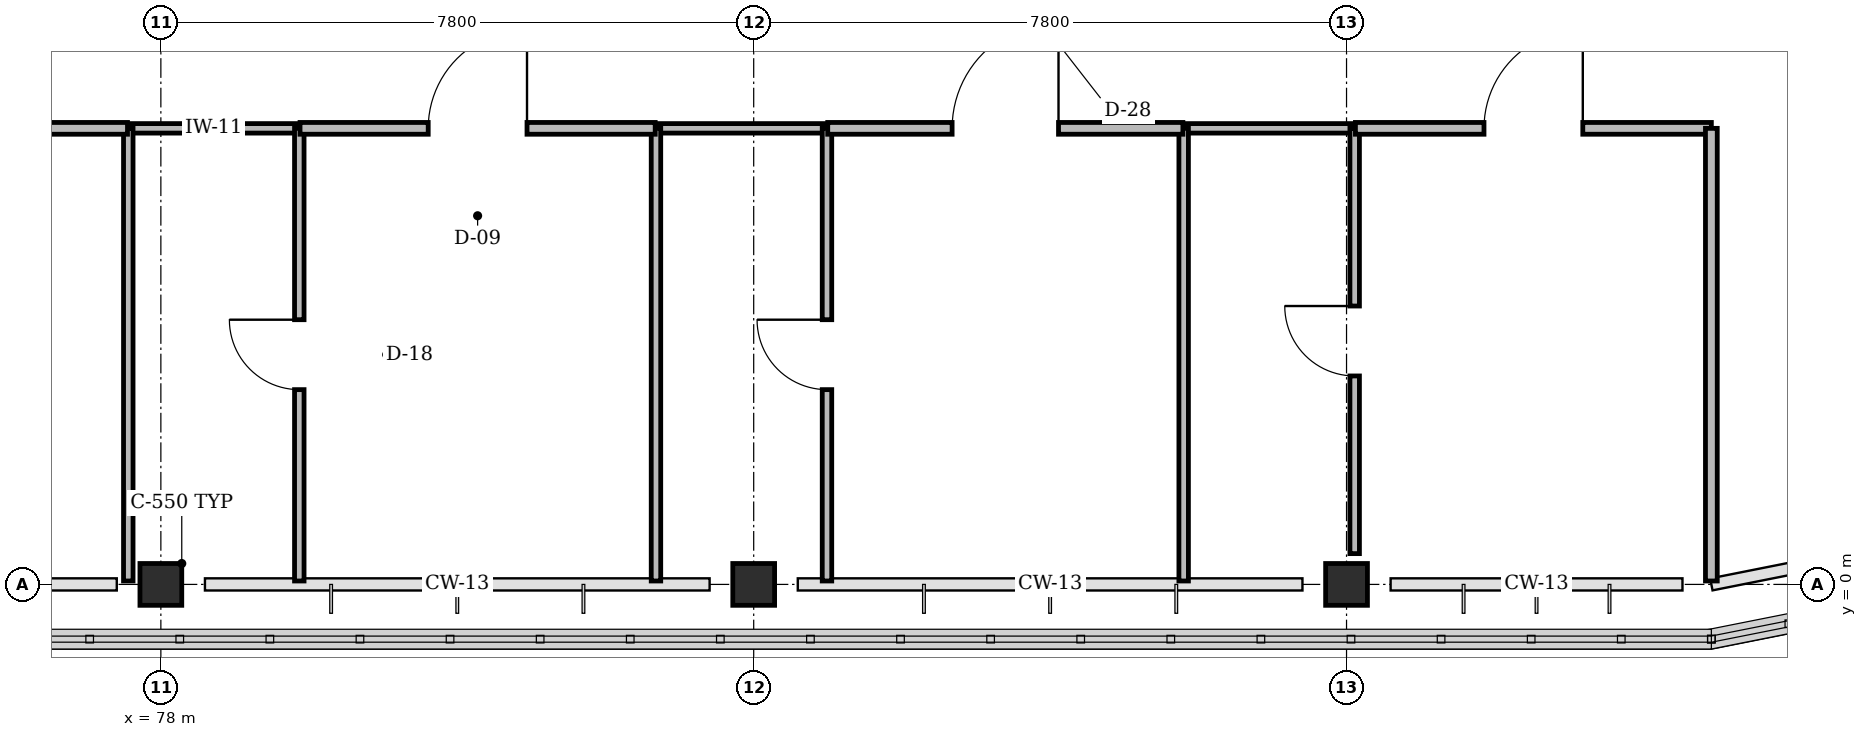
"""IFC4 building model, lengths in metres.
Left out: names, types, materials, properties, quantities, classifications, styles, units other than length and angle.
Written with IfcOpenShell. Run it as: python <this file> out.ifc"""

import sys

from ifc_helpers import new_model, si_unit, direction, frame, frame_2d, origin, origin_2d, place, context, subcontext, project, spatial, rectangle, extrude, element, fill, save


model = new_model("IFC4")
c1 = context("Model", 3, precision=1e-05, world=origin(), true_north=direction((0.0, 1.0)))
c2 = subcontext(c1, "Body", "Model", "MODEL_VIEW")
j1 = project(units=[si_unit("LENGTHUNIT", "METRE"), si_unit("PLANEANGLEUNIT", "RADIAN")], contexts=[c1])
p1 = place(None, origin())
s1 = spatial("IfcSite", under=j1, at=p1, CompositionType="ELEMENT")
p2 = place(p1, origin())
s2 = spatial("IfcBuilding", under=s1, at=p2, CompositionType="ELEMENT")
p3 = place(p2, frame((0.0, 0.0, 34.8)))
s3 = spatial("IfcBuildingStorey", under=s2, at=p3, CompositionType="ELEMENT", Elevation=34.8)
for number, where, z_axis, x_axis in (
    (1, (78.0, 0.0, 0.0), (0.0, 0.0, 1.0), (1.0, 0.0, 0.0)),
    (2, (85.8, 0.0, 0.0), (0.0, 0.0, 1.0), (1.0, 0.0, 0.0)),
    (3, (93.6, 0.0, 0.0), (0.0, 0.0, 1.0), (1.0, 0.0, 0.0)),
):
    element("IfcColumn", number, at=place(p3, frame(where, z_axis=z_axis, x_axis=x_axis)), inside=s3, PredefinedType="COLUMN", context=c2, shape_type="SweptSolid", body=[
        extrude(rectangle(XDim=0.55, YDim=0.55, at=origin_2d()), origin(), (0.0, 0.0, 1.0), 4.2),
    ])
p4 = place(p3, frame((77.571, 6.0, 0.0), z_axis=(0.0, 0.0, 1.0), x_axis=(1.0, 0.0, 0.0)))
e4 = element("IfcWall", 4, at=p4, inside=s3, PredefinedType="PARTITIONING", context=c2, shape_type="SweptSolid", body=[
    extrude(rectangle(XDim=2.25, YDim=0.125, at=frame_2d((1.125, 0.0))), origin(), (0.0, 0.0, 1.0), 3.9),
])
p5 = place(p3, frame((77.571, 0.045, 0.0), z_axis=(0.0, 0.0, 1.0), x_axis=(0.0, 1.0, 0.0)))
e5 = element("IfcWall", 5, at=p5, inside=s3, PredefinedType="PARTITIONING", context=c2, shape_type="SweptSolid", body=[
    extrude(rectangle(XDim=5.955, YDim=0.125, at=frame_2d((2.978, 0.0))), origin(), (0.0, 0.0, 1.0), 3.32),
])
p6 = place(p3, frame((79.821, 0.045, 0.0), z_axis=(0.0, 0.0, 1.0), x_axis=(0.0, 1.0, 0.0)))
e6 = element("IfcWall", 6, at=p6, inside=s3, PredefinedType="PARTITIONING", context=c2, shape_type="SweptSolid", body=[
    extrude(rectangle(XDim=5.955, YDim=0.125, at=frame_2d((2.978, 0.0))), origin(), (0.0, 0.0, 1.0), 3.9),
])
p7 = place(p6, frame((2.518, 0.0, 0.0)))
e7 = element("IfcOpeningElement", 7, at=p7, cuts=e6, PredefinedType="OPENING", context=c2, shape_type="SweptSolid", body=[
    extrude(rectangle(XDim=0.92, YDim=2.1, at=frame_2d((0.46, 1.05))), frame((0.0, 0.073, 0.0), z_axis=(0.0, -1.0, 0.0), x_axis=(1.0, 0.0, 0.0)), (0.0, 0.0, 1.0), 0.145),
])
p8 = place(p3, frame((84.514, 6.0, 0.0), z_axis=(0.0, 0.0, 1.0), x_axis=(1.0, 0.0, 0.0)))
e8 = element("IfcWall", 8, at=p8, inside=s3, PredefinedType="PARTITIONING", context=c2, shape_type="SweptSolid", body=[
    extrude(rectangle(XDim=2.25, YDim=0.125, at=frame_2d((1.125, 0.0))), origin(), (0.0, 0.0, 1.0), 3.9),
])
p9 = place(p3, frame((84.514, 0.045, 0.0), z_axis=(0.0, 0.0, 1.0), x_axis=(0.0, 1.0, 0.0)))
e9 = element("IfcWall", 9, at=p9, inside=s3, PredefinedType="PARTITIONING", context=c2, shape_type="SweptSolid", body=[
    extrude(rectangle(XDim=5.955, YDim=0.125, at=frame_2d((2.978, 0.0))), origin(), (0.0, 0.0, 1.0), 3.9),
])
p10 = place(p3, frame((86.764, 0.045, 0.0), z_axis=(0.0, 0.0, 1.0), x_axis=(0.0, 1.0, 0.0)))
e10 = element("IfcWall", 10, at=p10, inside=s3, PredefinedType="PARTITIONING", context=c2, shape_type="SweptSolid", body=[
    extrude(rectangle(XDim=5.955, YDim=0.125, at=frame_2d((2.978, 0.0))), origin(), (0.0, 0.0, 1.0), 3.9),
])
p11 = place(p10, frame((2.518, 0.0, 0.0)))
e11 = element("IfcOpeningElement", 11, at=p11, cuts=e10, PredefinedType="OPENING", context=c2, shape_type="SweptSolid", body=[
    extrude(rectangle(XDim=0.92, YDim=2.1, at=frame_2d((0.46, 1.05))), frame((0.0, 0.073, 0.0), z_axis=(0.0, -1.0, 0.0), x_axis=(1.0, 0.0, 0.0)), (0.0, 0.0, 1.0), 0.145),
])
p12 = place(p3, frame((91.457, 6.0, 0.0), z_axis=(0.0, 0.0, 1.0), x_axis=(1.0, 0.0, 0.0)))
e12 = element("IfcWall", 12, at=p12, inside=s3, PredefinedType="PARTITIONING", context=c2, shape_type="SweptSolid", body=[
    extrude(rectangle(XDim=2.25, YDim=0.125, at=frame_2d((1.125, 0.0))), origin(), (0.0, 0.0, 1.0), 3.9),
])
p13 = place(p3, frame((91.457, 0.045, 0.0), z_axis=(0.0, 0.0, 1.0), x_axis=(0.0, 1.0, 0.0)))
e13 = element("IfcWall", 13, at=p13, inside=s3, PredefinedType="PARTITIONING", context=c2, shape_type="SweptSolid", body=[
    extrude(rectangle(XDim=5.955, YDim=0.125, at=frame_2d((2.978, 0.0))), origin(), (0.0, 0.0, 1.0), 3.9),
])
p14 = place(p3, frame((93.707, 0.405, 0.0), z_axis=(0.0, 0.0, 1.0), x_axis=(0.0, 1.0, 0.0)))
e14 = element("IfcWall", 14, at=p14, inside=s3, PredefinedType="PARTITIONING", context=c2, shape_type="SweptSolid", body=[
    extrude(rectangle(XDim=5.595, YDim=0.125, at=frame_2d((2.797, 0.0))), origin(), (0.0, 0.0, 1.0), 3.305),
])
p15 = place(p14, frame((2.337, 0.0, 0.0)))
e15 = element("IfcOpeningElement", 15, at=p15, cuts=e14, PredefinedType="OPENING", context=c2, shape_type="SweptSolid", body=[
    extrude(rectangle(XDim=0.92, YDim=2.1, at=frame_2d((0.46, 1.05))), frame((0.0, 0.073, 0.0), z_axis=(0.0, -1.0, 0.0), x_axis=(1.0, 0.0, 0.0)), (0.0, 0.0, 1.0), 0.145),
])
p16 = place(p3, frame((72.889, 6.0, 0.0), z_axis=(0.0, 0.0, 1.0), x_axis=(1.0, 0.0, 0.0)))
e16 = element("IfcWall", 16, at=p16, inside=s3, PredefinedType="PARTITIONING", context=c2, shape_type="SweptSolid", body=[
    extrude(rectangle(XDim=4.672, YDim=0.155, at=frame_2d((2.336, 0.0))), origin(), (0.0, 0.0, 1.0), 3.9),
])
p17 = place(p16, frame((1.636, 0.0, 0.0)))
e17 = element("IfcOpeningElement", 17, at=p17, cuts=e16, PredefinedType="OPENING", context=c2, shape_type="SweptSolid", body=[
    extrude(rectangle(XDim=1.4, YDim=2.2, at=frame_2d((0.7, 1.1))), frame((0.0, 0.087, 0.0), z_axis=(0.0, -1.0, 0.0), x_axis=(1.0, 0.0, 0.0)), (0.0, 0.0, 1.0), 0.175),
])
p18 = place(p3, frame((79.831, 6.0, 0.0), z_axis=(0.0, 0.0, 1.0), x_axis=(1.0, 0.0, 0.0)))
e18 = element("IfcWall", 18, at=p18, inside=s3, PredefinedType="PARTITIONING", context=c2, shape_type="SweptSolid", body=[
    extrude(rectangle(XDim=4.673, YDim=0.155, at=frame_2d((2.336, 0.0))), origin(), (0.0, 0.0, 1.0), 3.9),
])
p19 = place(p18, frame((1.687, 0.0, 0.0)))
e19 = element("IfcOpeningElement", 19, at=p19, cuts=e18, PredefinedType="OPENING", context=c2, shape_type="SweptSolid", body=[
    extrude(rectangle(XDim=1.3, YDim=2.15, at=frame_2d((0.65, 1.075))), frame((0.0, 0.087, 0.0), z_axis=(0.0, -1.0, 0.0), x_axis=(1.0, 0.0, 0.0)), (0.0, 0.0, 1.0), 0.175),
])
p20 = place(p3, frame((86.774, 6.0, 0.0), z_axis=(0.0, 0.0, 1.0), x_axis=(1.0, 0.0, 0.0)))
e20 = element("IfcWall", 20, at=p20, inside=s3, PredefinedType="PARTITIONING", context=c2, shape_type="SweptSolid", body=[
    extrude(rectangle(XDim=4.673, YDim=0.155, at=frame_2d((2.336, 0.0))), origin(), (0.0, 0.0, 1.0), 3.9),
])
p21 = place(p20, frame((1.636, 0.0, 0.0)))
e21 = element("IfcOpeningElement", 21, at=p21, cuts=e20, PredefinedType="OPENING", context=c2, shape_type="SweptSolid", body=[
    extrude(rectangle(XDim=1.4, YDim=2.2, at=frame_2d((0.7, 1.1))), frame((0.0, 0.087, 0.0), z_axis=(0.0, -1.0, 0.0), x_axis=(1.0, 0.0, 0.0)), (0.0, 0.0, 1.0), 0.175),
])
p22 = place(p3, frame((93.717, 6.0, 0.0), z_axis=(0.0, 0.0, 1.0), x_axis=(1.0, 0.0, 0.0)))
e22 = element("IfcWall", 22, at=p22, inside=s3, PredefinedType="PARTITIONING", context=c2, shape_type="SweptSolid", body=[
    extrude(rectangle(XDim=4.683, YDim=0.155, at=frame_2d((2.341, 0.0))), origin(), (0.0, 0.0, 1.0), 3.9),
])
p23 = place(p22, frame((1.691, 0.0, 0.0)))
e23 = element("IfcOpeningElement", 23, at=p23, cuts=e22, PredefinedType="OPENING", context=c2, shape_type="SweptSolid", body=[
    extrude(rectangle(XDim=1.3, YDim=2.15, at=frame_2d((0.65, 1.075))), frame((0.0, 0.087, 0.0), z_axis=(0.0, -1.0, 0.0), x_axis=(1.0, 0.0, 0.0)), (0.0, 0.0, 1.0), 0.175),
])
p24 = place(p3, frame((98.4, 0.045, 0.0), z_axis=(0.0, 0.0, 1.0), x_axis=(0.0, 1.0, 0.0)))
e24 = element("IfcWall", 24, at=p24, inside=s3, PredefinedType="PARTITIONING", context=c2, shape_type="SweptSolid", body=[
    extrude(rectangle(XDim=5.955, YDim=0.155, at=frame_2d((2.978, 0.0))), origin(), (0.0, 0.0, 1.0), 3.9),
])
p25 = place(p7, origin())
e25 = element("IfcDoor", 25, at=p25, inside=s3, OperationType="SINGLE_SWING_RIGHT", PredefinedType="DOOR", context=c2, shape_type="SweptSolid", body=[
    extrude(rectangle(XDim=0.92, YDim=2.1, at=frame_2d((0.46, 1.05))), frame((0.0, 0.025, 0.0), z_axis=(0.0, -1.0, 0.0), x_axis=(1.0, 0.0, 0.0)), (0.0, 0.0, 1.0), 0.05),
])
fill(e7, e25)
p26 = place(p11, origin())
e26 = element("IfcDoor", 26, at=p26, inside=s3, OperationType="SINGLE_SWING_RIGHT", PredefinedType="DOOR", context=c2, shape_type="SweptSolid", body=[
    extrude(rectangle(XDim=0.92, YDim=2.1, at=frame_2d((0.46, 1.05))), frame((0.0, 0.025, 0.0), z_axis=(0.0, -1.0, 0.0), x_axis=(1.0, 0.0, 0.0)), (0.0, 0.0, 1.0), 0.05),
])
fill(e11, e26)
p27 = place(p15, origin())
e27 = element("IfcDoor", 27, at=p27, inside=s3, OperationType="SINGLE_SWING_RIGHT", PredefinedType="DOOR", context=c2, shape_type="SweptSolid", body=[
    extrude(rectangle(XDim=0.92, YDim=2.1, at=frame_2d((0.46, 1.05))), frame((0.0, 0.025, 0.0), z_axis=(0.0, -1.0, 0.0), x_axis=(1.0, 0.0, 0.0)), (0.0, 0.0, 1.0), 0.05),
])
fill(e15, e27)
p28 = place(p19, origin())
e28 = element("IfcDoor", 28, at=p28, inside=s3, OperationType="SINGLE_SWING_RIGHT", PredefinedType="DOOR", context=c2, shape_type="SweptSolid", body=[
    extrude(rectangle(XDim=1.3, YDim=2.15, at=frame_2d((0.65, 1.075))), frame((0.0, 0.025, 0.0), z_axis=(0.0, -1.0, 0.0), x_axis=(1.0, 0.0, 0.0)), (0.0, 0.0, 1.0), 0.05),
])
fill(e19, e28)
p29 = place(p21, origin())
e29 = element("IfcDoor", 29, at=p29, inside=s3, OperationType="SINGLE_SWING_RIGHT", PredefinedType="DOOR", context=c2, shape_type="SweptSolid", body=[
    extrude(rectangle(XDim=1.4, YDim=2.2, at=frame_2d((0.7, 1.1))), frame((0.0, 0.025, 0.0), z_axis=(0.0, -1.0, 0.0), x_axis=(1.0, 0.0, 0.0)), (0.0, 0.0, 1.0), 0.05),
])
fill(e21, e29)
p30 = place(p23, origin())
e30 = element("IfcDoor", 30, at=p30, inside=s3, OperationType="SINGLE_SWING_RIGHT", PredefinedType="DOOR", context=c2, shape_type="SweptSolid", body=[
    extrude(rectangle(XDim=1.3, YDim=2.15, at=frame_2d((0.65, 1.075))), frame((0.0, 0.025, 0.0), z_axis=(0.0, -1.0, 0.0), x_axis=(1.0, 0.0, 0.0)), (0.0, 0.0, 1.0), 0.05),
])
fill(e23, e30)
save(model, sys.argv[1])
